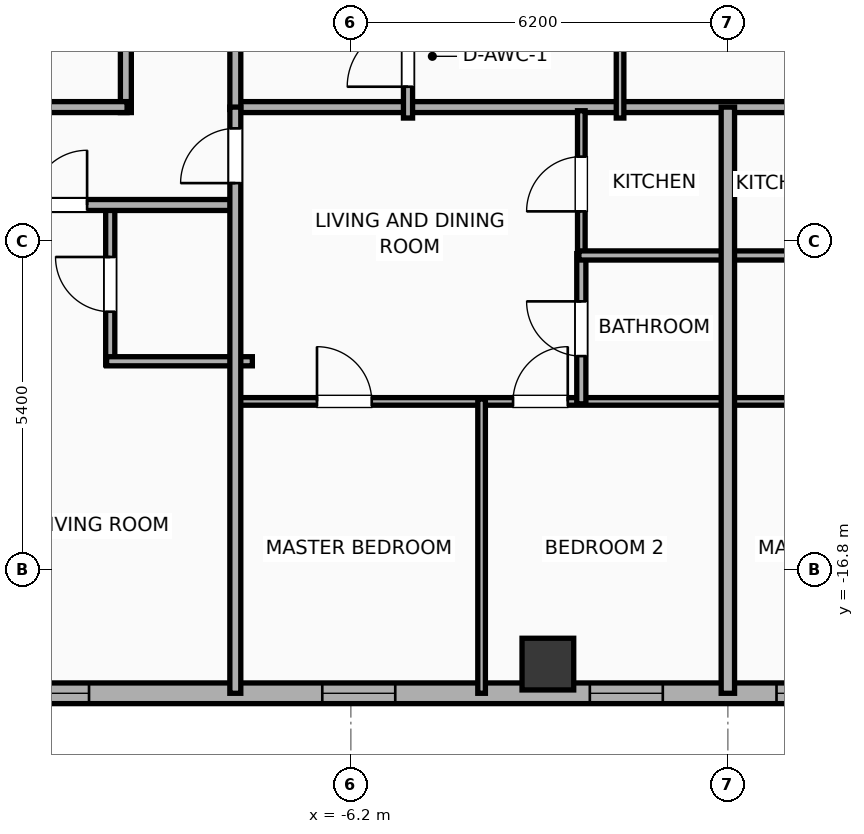
"""IFC4 building model, lengths in metres.
Left out: names, types, materials, properties, quantities, classifications, styles, units other than length and angle.
Written with IfcOpenShell. Run it as: python <this file> out.ifc"""

import sys

from ifc_helpers import new_model, si_unit, direction, frame, frame_2d, origin, origin_2d, place, context, subcontext, project, spatial, rectangle, hollow_rectangle, extrude, element, fill, save


model = new_model("IFC4")
c1 = context("Model", 3, precision=1e-05, world=origin(), true_north=direction((0.0, 1.0)))
c2 = subcontext(c1, "Body", "Model", "MODEL_VIEW")
j1 = project(units=[si_unit("LENGTHUNIT", "METRE"), si_unit("PLANEANGLEUNIT", "RADIAN")], contexts=[c1])
p1 = place(None, origin())
s1 = spatial("IfcSite", under=j1, at=p1, CompositionType="ELEMENT")
p2 = place(p1, origin())
s2 = spatial("IfcBuilding", under=s1, at=p2, CompositionType="ELEMENT")
p3 = place(p2, frame((0.0, 0.0, 223.6)))
s3 = spatial("IfcBuildingStorey", under=s2, at=p3, CompositionType="ELEMENT", Elevation=223.6)
p4 = place(p3, frame((-2.96, -18.35, 0.0), z_axis=(0.0, 0.0, 1.0), x_axis=(1.0, 0.0, 0.0)))
e1 = element("IfcColumn", 1, at=p4, inside=s3, PredefinedType="COLUMN", context=c2, shape_type="SweptSolid", body=[
    extrude(hollow_rectangle(XDim=0.85, YDim=0.85, WallThickness=0.028, at=origin_2d()), origin(), (0.0, 0.0, 1.0), 3.9),
])
p5 = place(p3, frame((26.783, -18.83, 0.0), z_axis=(0.0, 0.0, 1.0), x_axis=(-1.0, 0.0, 0.0)))
e2 = element("IfcWall", 2, at=p5, inside=s3, PredefinedType="ELEMENTEDWALL", context=c2, shape_type="SweptSolid", body=[
    extrude(rectangle(XDim=49.566, YDim=0.34, at=frame_2d((24.783, 0.0))), origin(), (0.0, 0.0, 1.0), 3.65),
])
p6 = place(p5, frame((23.583, 0.0, 0.75)))
e3 = element("IfcOpeningElement", 3, at=p6, cuts=e2, PredefinedType="OPENING", context=c2, shape_type="SweptSolid", body=[
    extrude(rectangle(XDim=2.4, YDim=2.1, at=frame_2d((1.2, 1.05))), frame((0.0, 0.18, 0.0), z_axis=(0.0, -1.0, 0.0), x_axis=(1.0, 0.0, 0.0)), (0.0, 0.0, 1.0), 0.36),
])
p7 = place(p5, frame((41.756, 0.0, 0.75)))
e4 = element("IfcOpeningElement", 4, at=p7, cuts=e2, PredefinedType="OPENING", context=c2, shape_type="SweptSolid", body=[
    extrude(rectangle(XDim=2.4, YDim=2.1, at=frame_2d((1.2, 1.05))), frame((0.0, 0.18, 0.0), z_axis=(0.0, -1.0, 0.0), x_axis=(1.0, 0.0, 0.0)), (0.0, 0.0, 1.0), 0.36),
])
p8 = place(p5, frame((47.222, 0.0, 0.75)))
e5 = element("IfcOpeningElement", 5, at=p8, cuts=e2, PredefinedType="OPENING", context=c2, shape_type="SweptSolid", body=[
    extrude(rectangle(XDim=1.2, YDim=2.05, at=frame_2d((0.6, 1.025))), frame((0.0, 0.18, 0.0), z_axis=(0.0, -1.0, 0.0), x_axis=(1.0, 0.0, 0.0)), (0.0, 0.0, 1.0), 0.36),
])
p9 = place(p5, frame((45.08, 0.0, 0.75)))
e6 = element("IfcOpeningElement", 6, at=p9, cuts=e2, PredefinedType="OPENING", context=c2, shape_type="SweptSolid", body=[
    extrude(rectangle(XDim=1.2, YDim=2.05, at=frame_2d((0.6, 1.025))), frame((0.0, 0.18, 0.0), z_axis=(0.0, -1.0, 0.0), x_axis=(1.0, 0.0, 0.0)), (0.0, 0.0, 1.0), 0.36),
])
p10 = place(p5, frame((37.289, 0.0, 0.75)))
e7 = element("IfcOpeningElement", 7, at=p10, cuts=e2, PredefinedType="OPENING", context=c2, shape_type="SweptSolid", body=[
    extrude(rectangle(XDim=1.2, YDim=2.05, at=frame_2d((0.6, 1.025))), frame((0.0, 0.18, 0.0), z_axis=(0.0, -1.0, 0.0), x_axis=(1.0, 0.0, 0.0)), (0.0, 0.0, 1.0), 0.36),
])
p11 = place(p5, frame((16.115, 0.0, 0.75)))
e8 = element("IfcOpeningElement", 8, at=p11, cuts=e2, PredefinedType="OPENING", context=c2, shape_type="SweptSolid", body=[
    extrude(rectangle(XDim=1.2, YDim=2.05, at=frame_2d((0.6, 1.025))), frame((0.0, 0.18, 0.0), z_axis=(0.0, -1.0, 0.0), x_axis=(1.0, 0.0, 0.0)), (0.0, 0.0, 1.0), 0.36),
])
p12 = place(p5, frame((12.422, 0.0, 0.75)))
e9 = element("IfcOpeningElement", 9, at=p12, cuts=e2, PredefinedType="OPENING", context=c2, shape_type="SweptSolid", body=[
    extrude(rectangle(XDim=1.2, YDim=2.05, at=frame_2d((0.6, 1.025))), frame((0.0, 0.18, 0.0), z_axis=(0.0, -1.0, 0.0), x_axis=(1.0, 0.0, 0.0)), (0.0, 0.0, 1.0), 0.36),
])
p13 = place(p5, frame((8.09, 0.0, 0.75)))
e10 = element("IfcOpeningElement", 10, at=p13, cuts=e2, PredefinedType="OPENING", context=c2, shape_type="SweptSolid", body=[
    extrude(rectangle(XDim=1.2, YDim=2.05, at=frame_2d((0.6, 1.025))), frame((0.0, 0.18, 0.0), z_axis=(0.0, -1.0, 0.0), x_axis=(1.0, 0.0, 0.0)), (0.0, 0.0, 1.0), 0.36),
])
p14 = place(p5, frame((4.637, 0.0, 0.75)))
e11 = element("IfcOpeningElement", 11, at=p14, cuts=e2, PredefinedType="OPENING", context=c2, shape_type="SweptSolid", body=[
    extrude(rectangle(XDim=1.2, YDim=2.05, at=frame_2d((0.6, 1.025))), frame((0.0, 0.18, 0.0), z_axis=(0.0, -1.0, 0.0), x_axis=(1.0, 0.0, 0.0)), (0.0, 0.0, 1.0), 0.36),
])
p15 = place(p5, frame((1.811, 0.0, 0.75)))
e12 = element("IfcOpeningElement", 12, at=p15, cuts=e2, PredefinedType="OPENING", context=c2, shape_type="SweptSolid", body=[
    extrude(rectangle(XDim=1.2, YDim=2.05, at=frame_2d((0.6, 1.025))), frame((0.0, 0.18, 0.0), z_axis=(0.0, -1.0, 0.0), x_axis=(1.0, 0.0, 0.0)), (0.0, 0.0, 1.0), 0.36),
])
p16 = place(p5, frame((32.253, 0.0, 0.75)))
e13 = element("IfcOpeningElement", 13, at=p16, cuts=e2, PredefinedType="OPENING", context=c2, shape_type="SweptSolid", body=[
    extrude(rectangle(XDim=1.2, YDim=2.05, at=frame_2d((0.6, 1.025))), frame((0.0, 0.18, 0.0), z_axis=(0.0, -1.0, 0.0), x_axis=(1.0, 0.0, 0.0)), (0.0, 0.0, 1.0), 0.36),
])
p17 = place(p5, frame((27.853, 0.0, 0.75)))
e14 = element("IfcOpeningElement", 14, at=p17, cuts=e2, PredefinedType="OPENING", context=c2, shape_type="SweptSolid", body=[
    extrude(rectangle(XDim=1.2, YDim=2.05, at=frame_2d((0.6, 1.025))), frame((0.0, 0.18, 0.0), z_axis=(0.0, -1.0, 0.0), x_axis=(1.0, 0.0, 0.0)), (0.0, 0.0, 1.0), 0.36),
])
p18 = place(p5, frame((20.473, 0.0, 0.75)))
e15 = element("IfcOpeningElement", 15, at=p18, cuts=e2, PredefinedType="OPENING", context=c2, shape_type="SweptSolid", body=[
    extrude(rectangle(XDim=1.2, YDim=2.05, at=frame_2d((0.6, 1.025))), frame((0.0, 0.18, 0.0), z_axis=(0.0, -1.0, 0.0), x_axis=(1.0, 0.0, 0.0)), (0.0, 0.0, 1.0), 0.36),
])
p19 = place(p3, frame((-9.9, -9.28, 0.0), z_axis=(0.0, 0.0, 1.0), x_axis=(0.0, 1.0, 0.0)))
e16 = element("IfcWall", 16, at=p19, inside=s3, PredefinedType="PARTITIONING", context=c2, shape_type="SweptSolid", body=[
    extrude(rectangle(XDim=18.56, YDim=0.18, at=frame_2d((9.28, 0.0))), origin(), (0.0, 0.0, 1.0), 3.65),
])
p20 = place(p19, frame((7.802, 0.0, 0.0)))
e17 = element("IfcOpeningElement", 17, at=p20, cuts=e16, PredefinedType="OPENING", context=c2, shape_type="SweptSolid", body=[
    extrude(rectangle(XDim=1.1, YDim=2.05, at=frame_2d((0.55, 1.025))), frame((0.0, 0.1, 0.0), z_axis=(0.0, -1.0, 0.0), x_axis=(1.0, 0.0, 0.0)), (0.0, 0.0, 1.0), 0.2),
])
p21 = place(p3, frame((-26.23, -9.19, 0.0), z_axis=(0.0, 0.0, 1.0), x_axis=(1.0, 0.0, 0.0)))
e18 = element("IfcWall", 18, at=p21, inside=s3, PredefinedType="PARTITIONING", context=c2, shape_type="SweptSolid", body=[
    extrude(rectangle(XDim=16.35, YDim=0.18, at=frame_2d((8.175, 0.0))), origin(), (0.0, 0.0, 1.0), 3.65),
])
p22 = place(p3, frame((-8.15, -9.19, 0.0), z_axis=(0.0, 0.0, 1.0), x_axis=(1.0, 0.0, 0.0)))
e19 = element("IfcWall", 19, at=p22, inside=s3, PredefinedType="PARTITIONING", context=c2, shape_type="SweptSolid", body=[
    extrude(rectangle(XDim=16.3, YDim=0.18, at=frame_2d((8.15, 0.0))), origin(), (0.0, 0.0, 1.0), 3.65),
])
p23 = place(p3, frame((-8.1, -9.23, 0.0), z_axis=(0.0, 0.0, 1.0), x_axis=(0.0, 1.0, 0.0)))
e20 = element("IfcWall", 20, at=p23, inside=s3, PredefinedType="PARTITIONING", context=c2, shape_type="SweptSolid", body=[
    extrude(rectangle(XDim=18.46, YDim=0.18, at=frame_2d((9.23, 0.0))), origin(), (0.0, 0.0, 1.0), 3.65),
])
p24 = place(p23, frame((1.346, 0.0, 0.0)))
e21 = element("IfcOpeningElement", 21, at=p24, cuts=e20, PredefinedType="OPENING", context=c2, shape_type="SweptSolid", body=[
    extrude(rectangle(XDim=1.0, YDim=2.05, at=frame_2d((0.5, 1.025))), frame((0.0, 0.1, 0.0), z_axis=(0.0, -1.0, 0.0), x_axis=(1.0, 0.0, 0.0)), (0.0, 0.0, 1.0), 0.2),
])
p25 = place(p23, frame((10.601, 0.0, 0.0)))
e22 = element("IfcOpeningElement", 22, at=p25, cuts=e20, PredefinedType="OPENING", context=c2, shape_type="SweptSolid", body=[
    extrude(rectangle(XDim=0.95, YDim=2.05, at=frame_2d((0.475, 1.025))), frame((0.0, 0.1, 0.0), z_axis=(0.0, -1.0, 0.0), x_axis=(1.0, 0.0, 0.0)), (0.0, 0.0, 1.0), 0.2),
])
p26 = place(p3, frame((-5.26, -9.37, 0.0), z_axis=(0.0, 0.0, 1.0), x_axis=(0.0, 1.0, 0.0)))
e23 = element("IfcWall", 23, at=p26, inside=s3, PredefinedType="PLUMBINGWALL", context=c2, shape_type="SweptSolid", body=[
    extrude(rectangle(XDim=3.35, YDim=0.15, at=frame_2d((1.675, 0.0))), origin(), (0.0, 0.0, 1.0), 3.65),
])
p27 = place(p26, frame((0.515, 0.0, 0.0)))
e24 = element("IfcOpeningElement", 24, at=p27, cuts=e23, PredefinedType="OPENING", context=c2, shape_type="SweptSolid", body=[
    extrude(rectangle(XDim=1.0, YDim=2.05, at=frame_2d((0.5, 1.025))), frame((0.0, 0.085, 0.0), z_axis=(0.0, -1.0, 0.0), x_axis=(1.0, 0.0, 0.0)), (0.0, 0.0, 1.0), 0.17),
])
p28 = place(p3, frame((-1.773, -9.37, 0.0), z_axis=(0.0, 0.0, 1.0), x_axis=(0.0, 1.0, 0.0)))
e25 = element("IfcWall", 25, at=p28, inside=s3, PredefinedType="PARTITIONING", context=c2, shape_type="SweptSolid", body=[
    extrude(rectangle(XDim=18.69, YDim=0.125, at=frame_2d((9.345, 0.0))), origin(), (0.0, 0.0, 1.0), 3.65),
])
p29 = place(p28, frame((8.87, 0.0, 0.0)))
e26 = element("IfcOpeningElement", 26, at=p29, cuts=e25, PredefinedType="OPENING", context=c2, shape_type="SweptSolid", body=[
    extrude(rectangle(XDim=0.95, YDim=2.05, at=frame_2d((0.475, 1.025))), frame((0.0, 0.073, 0.0), z_axis=(0.0, -1.0, 0.0), x_axis=(1.0, 0.0, 0.0)), (0.0, 0.0, 1.0), 0.145),
])
p30 = place(p3, frame((-10.157, -13.43, 0.0), z_axis=(0.0, 0.0, 1.0), x_axis=(0.0, 1.0, 0.0)))
e27 = element("IfcWall", 27, at=p30, inside=s3, PredefinedType="PLUMBINGWALL", context=c2, shape_type="SweptSolid", body=[
    extrude(rectangle(XDim=2.65, YDim=0.15, at=frame_2d((1.325, 0.0))), origin(), (0.0, 0.0, 1.0), 3.65),
])
p31 = place(p30, frame((0.875, 0.0, 0.0)))
e28 = element("IfcOpeningElement", 28, at=p31, cuts=e27, PredefinedType="OPENING", context=c2, shape_type="SweptSolid", body=[
    extrude(rectangle(XDim=0.9, YDim=2.05, at=frame_2d((0.45, 1.025))), frame((0.0, 0.085, 0.0), z_axis=(0.0, -1.0, 0.0), x_axis=(1.0, 0.0, 0.0)), (0.0, 0.0, 1.0), 0.17),
])
p32 = place(p3, frame((-10.217, -13.37, 0.0), z_axis=(0.0, 0.0, 1.0), x_axis=(1.0, 0.0, 0.0)))
e29 = element("IfcWall", 29, at=p32, inside=s3, PredefinedType="PLUMBINGWALL", context=c2, shape_type="SweptSolid", body=[
    extrude(rectangle(XDim=2.397, YDim=0.15, at=frame_2d((1.198, 0.0))), origin(), (0.0, 0.0, 1.0), 3.65),
])
p33 = place(p3, frame((-26.23, -10.8, 0.0), z_axis=(0.0, 0.0, 1.0), x_axis=(1.0, 0.0, 0.0)))
e30 = element("IfcWall", 30, at=p33, inside=s3, PredefinedType="PARTITIONING", context=c2, shape_type="SweptSolid", body=[
    extrude(rectangle(XDim=18.15, YDim=0.18, at=frame_2d((9.075, 0.0))), origin(), (0.0, 0.0, 1.0), 3.65),
])
p34 = place(p33, frame((2.659, 0.0, 0.0)))
e31 = element("IfcOpeningElement", 31, at=p34, cuts=e30, PredefinedType="OPENING", context=c2, shape_type="SweptSolid", body=[
    extrude(rectangle(XDim=0.9, YDim=2.05, at=frame_2d((0.45, 1.025))), frame((0.0, 0.1, 0.0), z_axis=(0.0, -1.0, 0.0), x_axis=(1.0, 0.0, 0.0)), (0.0, 0.0, 1.0), 0.2),
])
p35 = place(p33, frame((9.754, 0.0, 0.0)))
e32 = element("IfcOpeningElement", 32, at=p35, cuts=e30, PredefinedType="OPENING", context=c2, shape_type="SweptSolid", body=[
    extrude(rectangle(XDim=1.15, YDim=2.05, at=frame_2d((0.575, 1.025))), frame((0.0, 0.1, 0.0), z_axis=(0.0, -1.0, 0.0), x_axis=(1.0, 0.0, 0.0)), (0.0, 0.0, 1.0), 0.2),
])
p36 = place(p33, frame((14.792, 0.0, 0.0)))
e33 = element("IfcOpeningElement", 33, at=p36, cuts=e30, PredefinedType="OPENING", context=c2, shape_type="SweptSolid", body=[
    extrude(rectangle(XDim=0.9, YDim=2.05, at=frame_2d((0.45, 1.025))), frame((0.0, 0.1, 0.0), z_axis=(0.0, -1.0, 0.0), x_axis=(1.0, 0.0, 0.0)), (0.0, 0.0, 1.0), 0.2),
])
p37 = place(p3, frame((-8.08, -14.03, 0.0), z_axis=(0.0, 0.0, 1.0), x_axis=(1.0, 0.0, 0.0)))
e34 = element("IfcWall", 34, at=p37, inside=s3, PredefinedType="PARTITIONING", context=c2, shape_type="SweptSolid", body=[
    extrude(rectangle(XDim=8.06, YDim=0.125, at=frame_2d((4.03, 0.0))), origin(), (0.0, 0.0, 1.0), 3.65),
])
p38 = place(p37, frame((1.323, 0.0, 0.0)))
e35 = element("IfcOpeningElement", 35, at=p38, cuts=e34, PredefinedType="OPENING", context=c2, shape_type="SweptSolid", body=[
    extrude(rectangle(XDim=0.9, YDim=2.05, at=frame_2d((0.45, 1.025))), frame((0.0, 0.073, 0.0), z_axis=(0.0, -1.0, 0.0), x_axis=(1.0, 0.0, 0.0)), (0.0, 0.0, 1.0), 0.145),
])
p39 = place(p37, frame((4.547, 0.0, 0.0)))
e36 = element("IfcOpeningElement", 36, at=p39, cuts=e34, PredefinedType="OPENING", context=c2, shape_type="SweptSolid", body=[
    extrude(rectangle(XDim=0.9, YDim=2.05, at=frame_2d((0.45, 1.025))), frame((0.0, 0.073, 0.0), z_axis=(0.0, -1.0, 0.0), x_axis=(1.0, 0.0, 0.0)), (0.0, 0.0, 1.0), 0.145),
])
p40 = place(p3, frame((-2.41, -11.66, 0.0), z_axis=(0.0, 0.0, 1.0), x_axis=(0.0, 1.0, 0.0)))
e37 = element("IfcWall", 37, at=p40, inside=s3, PredefinedType="PARTITIONING", context=c2, shape_type="SweptSolid", body=[
    extrude(rectangle(XDim=2.41, YDim=0.125, at=frame_2d((1.205, 0.0))), origin(), (0.0, 0.0, 1.0), 3.65),
])
p41 = place(p40, frame((0.755, 0.0, 0.0)))
e38 = element("IfcOpeningElement", 38, at=p41, cuts=e37, PredefinedType="OPENING", context=c2, shape_type="SweptSolid", body=[
    extrude(rectangle(XDim=0.9, YDim=2.05, at=frame_2d((0.45, 1.025))), frame((0.0, 0.073, 0.0), z_axis=(0.0, -1.0, 0.0), x_axis=(1.0, 0.0, 0.0)), (0.0, 0.0, 1.0), 0.145),
])
p42 = place(p3, frame((-2.41, -14.07, 0.0), z_axis=(0.0, 0.0, 1.0), x_axis=(0.0, 1.0, 0.0)))
e39 = element("IfcWall", 39, at=p42, inside=s3, PredefinedType="PLUMBINGWALL", context=c2, shape_type="SweptSolid", body=[
    extrude(rectangle(XDim=2.47, YDim=0.15, at=frame_2d((1.235, 0.0))), origin(), (0.0, 0.0, 1.0), 3.65),
])
p43 = place(p42, frame((0.785, 0.0, 0.0)))
e40 = element("IfcOpeningElement", 40, at=p43, cuts=e39, PredefinedType="OPENING", context=c2, shape_type="SweptSolid", body=[
    extrude(rectangle(XDim=0.9, YDim=2.05, at=frame_2d((0.45, 1.025))), frame((0.0, 0.085, 0.0), z_axis=(0.0, -1.0, 0.0), x_axis=(1.0, 0.0, 0.0)), (0.0, 0.0, 1.0), 0.17),
])
p44 = place(p3, frame((-2.45, -11.63, 0.0), z_axis=(0.0, 0.0, 1.0), x_axis=(1.0, 0.0, 0.0)))
e41 = element("IfcWall", 41, at=p44, inside=s3, PredefinedType="PLUMBINGWALL", context=c2, shape_type="SweptSolid", body=[
    extrude(rectangle(XDim=2.43, YDim=0.15, at=frame_2d((1.215, 0.0))), origin(), (0.0, 0.0, 1.0), 3.65),
])
p45 = place(p3, frame((-4.05, -18.83, 0.0), z_axis=(0.0, 0.0, 1.0), x_axis=(0.0, 1.0, 0.0)))
e42 = element("IfcWall", 42, at=p45, inside=s3, PredefinedType="PARTITIONING", context=c2, shape_type="SweptSolid", body=[
    extrude(rectangle(XDim=4.84, YDim=0.125, at=frame_2d((2.42, 0.0))), origin(), (0.0, 0.0, 1.0), 3.65),
])
p46 = place(p3, frame((-8.1, -18.83, 0.0), z_axis=(0.0, 0.0, 1.0), x_axis=(0.0, 1.0, 0.0)))
e43 = element("IfcWall", 43, at=p46, inside=s3, PredefinedType="PARTITIONING", context=c2, shape_type="SweptSolid", body=[
    extrude(rectangle(XDim=9.64, YDim=0.18, at=frame_2d((4.82, 0.0))), origin(), (0.0, 0.0, 1.0), 3.65),
])
p47 = place(p46, frame((8.39, 0.0, 0.0)))
e44 = element("IfcOpeningElement", 44, at=p47, cuts=e43, PredefinedType="OPENING", context=c2, shape_type="SweptSolid", body=[
    extrude(rectangle(XDim=0.9, YDim=2.05, at=frame_2d((0.45, 1.025))), frame((0.0, 0.1, 0.0), z_axis=(0.0, -1.0, 0.0), x_axis=(1.0, 0.0, 0.0)), (0.0, 0.0, 1.0), 0.2),
])
p48 = place(p3, frame((0.02, -14.03, 0.0), z_axis=(0.0, 0.0, 1.0), x_axis=(1.0, 0.0, 0.0)))
e45 = element("IfcWall", 45, at=p48, inside=s3, PredefinedType="PARTITIONING", context=c2, shape_type="SweptSolid", body=[
    extrude(rectangle(XDim=8.06, YDim=0.125, at=frame_2d((4.03, 0.0))), origin(), (0.0, 0.0, 1.0), 3.65),
])
p49 = place(p48, frame((1.323, 0.0, 0.0)))
e46 = element("IfcOpeningElement", 46, at=p49, cuts=e45, PredefinedType="OPENING", context=c2, shape_type="SweptSolid", body=[
    extrude(rectangle(XDim=0.9, YDim=2.05, at=frame_2d((0.45, 1.025))), frame((0.0, 0.073, 0.0), z_axis=(0.0, -1.0, 0.0), x_axis=(1.0, 0.0, 0.0)), (0.0, 0.0, 1.0), 0.145),
])
p50 = place(p48, frame((5.837, 0.0, 0.0)))
e47 = element("IfcOpeningElement", 47, at=p50, cuts=e45, PredefinedType="OPENING", context=c2, shape_type="SweptSolid", body=[
    extrude(rectangle(XDim=0.9, YDim=2.05, at=frame_2d((0.45, 1.025))), frame((0.0, 0.073, 0.0), z_axis=(0.0, -1.0, 0.0), x_axis=(1.0, 0.0, 0.0)), (0.0, 0.0, 1.0), 0.145),
])
p51 = place(p3, frame((0.02, -11.63, 0.0), z_axis=(0.0, 0.0, 1.0), x_axis=(1.0, 0.0, 0.0)))
e48 = element("IfcWall", 48, at=p51, inside=s3, PredefinedType="PLUMBINGWALL", context=c2, shape_type="SweptSolid", body=[
    extrude(rectangle(XDim=2.43, YDim=0.15, at=frame_2d((1.215, 0.0))), origin(), (0.0, 0.0, 1.0), 3.65),
])
p52 = place(p3, frame((0.0, -18.83, 0.0), z_axis=(0.0, 0.0, 1.0), x_axis=(0.0, 1.0, 0.0)))
e49 = element("IfcWall", 49, at=p52, inside=s3, PredefinedType="PARTITIONING", context=c2, shape_type="SweptSolid", body=[
    extrude(rectangle(XDim=9.64, YDim=0.22, at=frame_2d((4.82, 0.0))), origin(), (0.0, 0.0, 1.0), 3.65),
])
p53 = place(p6, origin())
e50 = element("IfcWindow", 50, at=p53, inside=s3, PartitioningType="SINGLE_PANEL", PredefinedType="WINDOW", context=c2, shape_type="SweptSolid", body=[
    extrude(rectangle(XDim=2.4, YDim=2.1, at=frame_2d((1.2, 1.05))), frame((0.0, 0.03, 0.0), z_axis=(0.0, -1.0, 0.0), x_axis=(1.0, 0.0, 0.0)), (0.0, 0.0, 1.0), 0.06),
])
fill(e3, e50)
p54 = place(p10, origin())
e51 = element("IfcWindow", 51, at=p54, inside=s3, PartitioningType="SINGLE_PANEL", PredefinedType="WINDOW", context=c2, shape_type="SweptSolid", body=[
    extrude(rectangle(XDim=1.2, YDim=2.05, at=frame_2d((0.6, 1.025))), frame((0.0, 0.03, 0.0), z_axis=(0.0, -1.0, 0.0), x_axis=(1.0, 0.0, 0.0)), (0.0, 0.0, 1.0), 0.06),
])
fill(e7, e51)
p55 = place(p16, origin())
e52 = element("IfcWindow", 52, at=p55, inside=s3, PartitioningType="SINGLE_PANEL", PredefinedType="WINDOW", context=c2, shape_type="SweptSolid", body=[
    extrude(rectangle(XDim=1.2, YDim=2.05, at=frame_2d((0.6, 1.025))), frame((0.0, 0.03, 0.0), z_axis=(0.0, -1.0, 0.0), x_axis=(1.0, 0.0, 0.0)), (0.0, 0.0, 1.0), 0.06),
])
fill(e13, e52)
p56 = place(p17, origin())
e53 = element("IfcWindow", 53, at=p56, inside=s3, PartitioningType="SINGLE_PANEL", PredefinedType="WINDOW", context=c2, shape_type="SweptSolid", body=[
    extrude(rectangle(XDim=1.2, YDim=2.05, at=frame_2d((0.6, 1.025))), frame((0.0, 0.03, 0.0), z_axis=(0.0, -1.0, 0.0), x_axis=(1.0, 0.0, 0.0)), (0.0, 0.0, 1.0), 0.06),
])
fill(e14, e53)
p57 = place(p27, origin())
e54 = element("IfcDoor", 54, at=p57, inside=s3, OperationType="SINGLE_SWING_LEFT", PredefinedType="DOOR", context=c2, shape_type="SweptSolid", body=[
    extrude(rectangle(XDim=1.0, YDim=2.05, at=frame_2d((0.5, 1.025))), frame((0.0, 0.025, 0.0), z_axis=(0.0, -1.0, 0.0), x_axis=(1.0, 0.0, 0.0)), (0.0, 0.0, 1.0), 0.05),
])
fill(e24, e54)
p58 = place(p31, origin())
e55 = element("IfcDoor", 55, at=p58, inside=s3, OperationType="SINGLE_SWING_RIGHT", PredefinedType="DOOR", context=c2, shape_type="SweptSolid", body=[
    extrude(rectangle(XDim=0.9, YDim=2.05, at=frame_2d((0.45, 1.025))), frame((0.0, 0.025, 0.0), z_axis=(0.0, -1.0, 0.0), x_axis=(1.0, 0.0, 0.0)), (0.0, 0.0, 1.0), 0.05),
])
fill(e28, e55)
p59 = place(p36, origin())
e56 = element("IfcDoor", 56, at=p59, inside=s3, OperationType="SINGLE_SWING_RIGHT", PredefinedType="DOOR", context=c2, shape_type="SweptSolid", body=[
    extrude(rectangle(XDim=0.9, YDim=2.05, at=frame_2d((0.45, 1.025))), frame((0.0, 0.025, 0.0), z_axis=(0.0, -1.0, 0.0), x_axis=(1.0, 0.0, 0.0)), (0.0, 0.0, 1.0), 0.05),
])
fill(e33, e56)
p60 = place(p38, origin())
e57 = element("IfcDoor", 57, at=p60, inside=s3, OperationType="SINGLE_SWING_LEFT", PredefinedType="DOOR", context=c2, shape_type="SweptSolid", body=[
    extrude(rectangle(XDim=0.9, YDim=2.05, at=frame_2d((0.45, 1.025))), frame((0.0, 0.025, 0.0), z_axis=(0.0, -1.0, 0.0), x_axis=(1.0, 0.0, 0.0)), (0.0, 0.0, 1.0), 0.05),
])
fill(e35, e57)
p61 = place(p39, origin())
e58 = element("IfcDoor", 58, at=p61, inside=s3, OperationType="SINGLE_SWING_RIGHT", PredefinedType="DOOR", context=c2, shape_type="SweptSolid", body=[
    extrude(rectangle(XDim=0.9, YDim=2.05, at=frame_2d((0.45, 1.025))), frame((0.0, 0.025, 0.0), z_axis=(0.0, -1.0, 0.0), x_axis=(1.0, 0.0, 0.0)), (0.0, 0.0, 1.0), 0.05),
])
fill(e36, e58)
p62 = place(p41, origin())
e59 = element("IfcDoor", 59, at=p62, inside=s3, OperationType="SINGLE_SWING_LEFT", PredefinedType="DOOR", context=c2, shape_type="SweptSolid", body=[
    extrude(rectangle(XDim=0.9, YDim=2.05, at=frame_2d((0.45, 1.025))), frame((0.0, 0.025, 0.0), z_axis=(0.0, -1.0, 0.0), x_axis=(1.0, 0.0, 0.0)), (0.0, 0.0, 1.0), 0.05),
])
fill(e38, e59)
p63 = place(p43, origin())
e60 = element("IfcDoor", 60, at=p63, inside=s3, OperationType="SINGLE_SWING_RIGHT", PredefinedType="DOOR", context=c2, shape_type="SweptSolid", body=[
    extrude(rectangle(XDim=0.9, YDim=2.05, at=frame_2d((0.45, 1.025))), frame((0.0, 0.025, 0.0), z_axis=(0.0, -1.0, 0.0), x_axis=(1.0, 0.0, 0.0)), (0.0, 0.0, 1.0), 0.05),
])
fill(e40, e60)
p64 = place(p47, origin())
e61 = element("IfcDoor", 61, at=p64, inside=s3, OperationType="SINGLE_SWING_LEFT", PredefinedType="DOOR", context=c2, shape_type="SweptSolid", body=[
    extrude(rectangle(XDim=0.9, YDim=2.05, at=frame_2d((0.45, 1.025))), frame((0.0, 0.025, 0.0), z_axis=(0.0, -1.0, 0.0), x_axis=(1.0, 0.0, 0.0)), (0.0, 0.0, 1.0), 0.05),
])
fill(e44, e61)
save(model, sys.argv[1])
